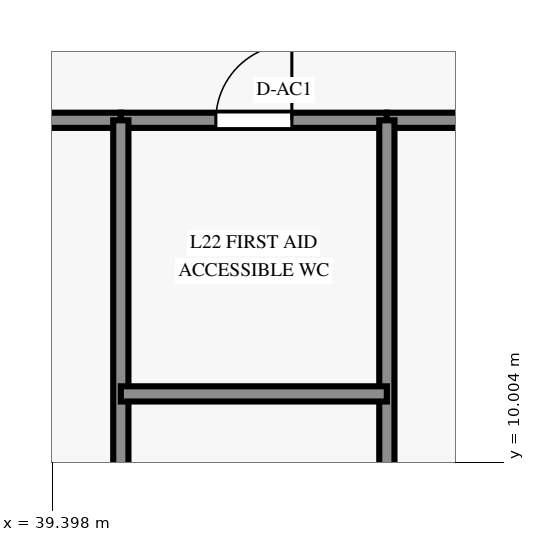
"""IFC4 building model, lengths in metres.
Left out: names, types, materials, properties, quantities, classifications, styles, units other than length and angle.
Written with IfcOpenShell. Run it as: python <this file> out.ifc"""

import sys

from ifc_helpers import new_model, si_unit, direction, frame, frame_2d, origin, place, context, subcontext, project, spatial, rectangle, extrude, source, transform, mapped, element, fill, save


model = new_model("IFC4")
c1 = context("Model", 3, precision=1e-05, world=origin(), true_north=direction((0.0, 1.0)))
c2 = subcontext(c1, "Body", "Model", "MODEL_VIEW")
j1 = project(units=[si_unit("LENGTHUNIT", "METRE"), si_unit("PLANEANGLEUNIT", "RADIAN")], contexts=[c1])
p1 = place(None, origin())
s1 = spatial("IfcSite", under=j1, at=p1, CompositionType="ELEMENT")
p2 = place(p1, origin())
s2 = spatial("IfcBuilding", under=s1, at=p2, CompositionType="ELEMENT")
p3 = place(p2, frame((0.0, 0.0, 70.4)))
s3 = spatial("IfcBuildingStorey", under=s2, at=p3, CompositionType="ELEMENT", Elevation=70.4)
p4 = place(p3, frame((32.2, 14.5, 0.0), z_axis=(0.0, 0.0, 1.0), x_axis=(1.0, 0.0, 0.0)))
e1 = element("IfcWall", 1, at=p4, inside=s3, PredefinedType="PARTITIONING", context=c2, shape_type="SweptSolid", body=[
    extrude(rectangle(XDim=8.1, YDim=0.2, at=frame_2d((4.05, 0.0))), origin(), (0.0, 0.0, 1.0), 3.61),
])
p5 = place(p4, frame((3.5, 0.0, 0.0)))
e2 = element("IfcOpeningElement", 2, at=p5, cuts=e1, PredefinedType="OPENING", context=c2, shape_type="SweptSolid", body=[
    extrude(rectangle(XDim=1.1, YDim=2.15, at=frame_2d((0.55, 1.075))), frame((0.0, 0.112, 0.0), z_axis=(0.0, -1.0, 0.0), x_axis=(1.0, 0.0, 0.0)), (0.0, 0.0, 1.0), 0.224),
])
p6 = place(p3, frame((40.3, 14.5, 0.0), z_axis=(0.0, 0.0, 1.0), x_axis=(1.0, 0.0, 0.0)))
e3 = element("IfcWall", 3, at=p6, inside=s3, PredefinedType="PARTITIONING", context=c2, shape_type="SweptSolid", body=[
    extrude(rectangle(XDim=3.5, YDim=0.2, at=frame_2d((1.75, 0.0))), origin(), (0.0, 0.0, 1.0), 3.61),
])
p7 = place(p6, frame((1.25, 0.0, 0.0)))
e4 = element("IfcOpeningElement", 4, at=p7, cuts=e3, PredefinedType="OPENING", context=c2, shape_type="SweptSolid", body=[
    extrude(rectangle(XDim=1.0, YDim=2.1, at=frame_2d((0.5, 1.05))), frame((0.0, 0.112, 0.0), z_axis=(0.0, -1.0, 0.0), x_axis=(1.0, 0.0, 0.0)), (0.0, 0.0, 1.0), 0.224),
])
p8 = place(p3, frame((43.8, 14.5, 0.0), z_axis=(0.0, 0.0, 1.0), x_axis=(1.0, 0.0, 0.0)))
e5 = element("IfcWall", 5, at=p8, inside=s3, PredefinedType="PARTITIONING", context=c2, shape_type="SweptSolid", body=[
    extrude(rectangle(XDim=3.15, YDim=0.2, at=frame_2d((1.575, 0.0))), origin(), (0.0, 0.0, 1.0), 3.61),
])
p9 = place(p8, frame((0.928, 0.0, 0.0)))
e6 = element("IfcOpeningElement", 6, at=p9, cuts=e5, PredefinedType="OPENING", context=c2, shape_type="SweptSolid", body=[
    extrude(rectangle(XDim=1.1, YDim=2.15, at=frame_2d((0.55, 1.075))), frame((0.0, 0.112, 0.0), z_axis=(0.0, -1.0, 0.0), x_axis=(1.0, 0.0, 0.0)), (0.0, 0.0, 1.0), 0.224),
])
for number, where, z_axis, x_axis in (
    (7, (40.3, 3.2, 0.0), (0.0, 0.0, 1.0), (0.0, 1.0, 0.0)),
    (8, (43.8, 3.2, 0.0), (0.0, 0.0, 1.0), (0.0, 1.0, 0.0)),
):
    element("IfcWall", number, at=place(p3, frame(where, z_axis=z_axis, x_axis=x_axis)), inside=s3, PredefinedType="PARTITIONING", context=c2, shape_type="SweptSolid", body=[
        extrude(rectangle(XDim=11.3, YDim=0.2, at=frame_2d((5.65, 0.0))), origin(), (0.0, 0.0, 1.0), 3.61),
    ])
p10 = place(p3, frame((40.3, 10.9, 0.0), z_axis=(0.0, 0.0, 1.0), x_axis=(1.0, 0.0, 0.0)))
e9 = element("IfcWall", 9, at=p10, inside=s3, PredefinedType="PARTITIONING", context=c2, shape_type="SweptSolid", body=[
    extrude(rectangle(XDim=3.5, YDim=0.2, at=frame_2d((1.75, 0.0))), origin(), (0.0, 0.0, 1.0), 3.61),
])
m1 = source(origin(), c2, "Body", "SweptSolid", [
    extrude(rectangle(XDim=1.0, YDim=2.1, at=frame_2d((0.5, 1.05))), frame((0.0, 0.025, 0.0), z_axis=(0.0, -1.0, 0.0), x_axis=(1.0, 0.0, 0.0)), (0.0, 0.0, 1.0), 0.05),
])
p11 = place(p7, origin())
e10 = element("IfcDoor", 10, at=p11, inside=s3, OperationType="SINGLE_SWING_RIGHT", PredefinedType="DOOR", context=c2, shape_type="MappedRepresentation", body=[
    mapped(m1, transform((0.0, 0.0, 0.0), scale=1.0)),
])
fill(e4, e10)
save(model, sys.argv[1])
